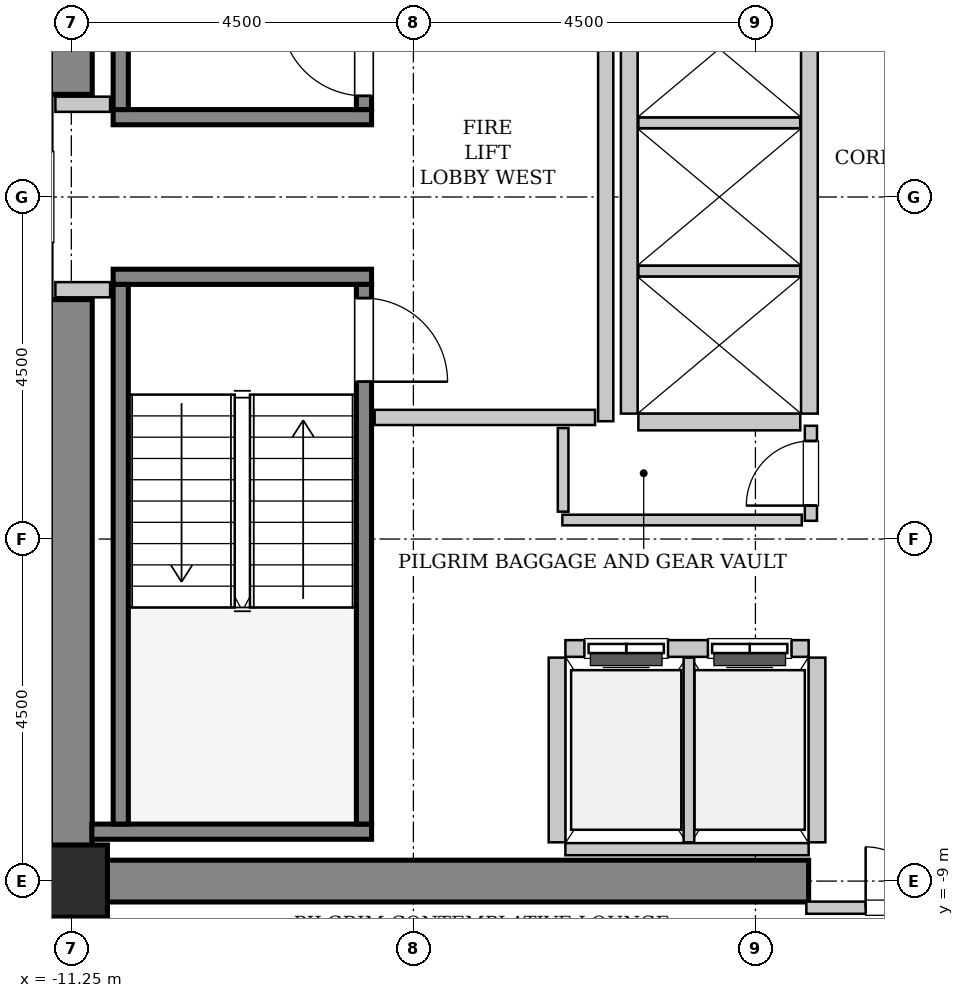
"""IFC4 building model, lengths in metres.
Left out: names, types, materials, properties, quantities, classifications, styles, units other than length and angle.
Written with IfcOpenShell. Run it as: python <this file> out.ifc"""

import sys

from ifc_helpers import new_model, si_unit, direction, frame, frame_2d, origin, origin_2d, place, context, subcontext, project, spatial, rectangle, hollow_rectangle, extrude, source, transform, mapped, element, fill, save


model = new_model("IFC4")
c1 = context("Model", 3, precision=1e-05, world=origin(), true_north=direction((0.0, 1.0)))
c2 = subcontext(c1, "Body", "Model", "MODEL_VIEW")
j1 = project(units=[si_unit("LENGTHUNIT", "METRE"), si_unit("PLANEANGLEUNIT", "RADIAN")], contexts=[c1])
p1 = place(None, origin())
s1 = spatial("IfcSite", under=j1, at=p1, CompositionType="ELEMENT")
p2 = place(p1, origin())
s2 = spatial("IfcBuilding", under=s1, at=p2, CompositionType="ELEMENT")
p3 = place(p2, frame((0.0, 0.0, 179.2)))
s3 = spatial("IfcBuildingStorey", under=s2, at=p3, CompositionType="ELEMENT", Elevation=179.2)
m1 = source(origin(), c2, "Body", "SweptSolid", [
    extrude(rectangle(XDim=9.975, YDim=0.55, at=frame_2d((4.987, 0.0))), origin(), (0.0, 0.0, 1.0), 3.8),
])
p4 = place(p3, frame((-11.525, -9.0, 0.0), z_axis=(0.0, 0.0, 1.0), x_axis=(1.0, 0.0, 0.0)))
e1 = element("IfcWall", 1, at=p4, inside=s3, PredefinedType="SHEAR", context=c2, shape_type="MappedRepresentation", body=[
    mapped(m1, transform((0.0, 0.0, 0.0), x_axis=(1.0, 0.0, 0.0), y_axis=(0.0, 1.0, 0.0), z_axis=(0.0, 0.0, 1.0), scale=1.0)),
])
m2 = source(origin(), c2, "Body", "SweptSolid", [
    extrude(rectangle(XDim=7.375, YDim=0.55, at=frame_2d((3.688, 0.0))), origin(), (0.0, 0.0, 1.0), 3.8),
])
for number, where, z_axis, x_axis in (
    (2, (-11.25, -8.725, 0.0), (0.0, 0.0, 1.0), (0.0, 1.0, 0.0)),
    (3, (-11.25, 1.35, 0.0), (0.0, 0.0, 1.0), (0.0, 1.0, 0.0)),
):
    element("IfcWall", number, at=place(p3, frame(where, z_axis=z_axis, x_axis=x_axis)), inside=s3, PredefinedType="SHEAR", context=c2, shape_type="MappedRepresentation", body=[
        mapped(m2, transform((0.0, 0.0, 0.0), x_axis=(1.0, 0.0, 0.0), y_axis=(0.0, 1.0, 0.0), z_axis=(0.0, 0.0, 1.0), scale=1.0)),
    ])
m3 = source(origin(), c2, "Body", "SweptSolid", [
    extrude(hollow_rectangle(XDim=0.95, YDim=0.95, WallThickness=0.045, InnerFilletRadius=0.045, OuterFilletRadius=0.09, at=origin_2d()), origin(), (0.0, 0.0, 1.0), 3.8),
])
p5 = place(p3, frame((-11.25, -9.0, 0.0), z_axis=(0.0, 0.0, 1.0), x_axis=(1.0, 0.0, 0.0)))
e4 = element("IfcColumn", 4, at=p5, inside=s3, PredefinedType="COLUMN", context=c2, shape_type="MappedRepresentation", body=[
    mapped(m3, transform((0.0, 0.0, 0.0), x_axis=(1.0, 0.0, 0.0), y_axis=(0.0, 1.0, 0.0), z_axis=(0.0, 0.0, 1.0), scale=1.0)),
])
m4 = source(origin(), c2, "Body", "SweptSolid", [
    extrude(rectangle(XDim=3.4, YDim=0.2, at=frame_2d((1.7, 0.0))), origin(), (0.0, 0.0, 1.0), 3.8),
])
p6 = place(p3, frame((-7.3, 1.05, 0.0), z_axis=(0.0, 0.0, 1.0), x_axis=(-1.0, 0.0, 0.0)))
e5 = element("IfcWall", 5, at=p6, inside=s3, PredefinedType="SOLIDWALL", context=c2, shape_type="MappedRepresentation", body=[
    mapped(m4, transform((0.0, 0.0, 0.0), x_axis=(1.0, 0.0, 0.0), y_axis=(0.0, 1.0, 0.0), z_axis=(0.0, 0.0, 1.0), scale=1.0)),
])
m5 = source(origin(), c2, "Body", "SweptSolid", [
    extrude(rectangle(XDim=7.1, YDim=0.2, at=frame_2d((3.55, 0.0))), origin(), (0.0, 0.0, 1.0), 3.8),
])
p7 = place(p3, frame((-7.4, 1.15, 0.0), z_axis=(0.0, 0.0, 1.0), x_axis=(0.0, 1.0, 0.0)))
e6 = element("IfcWall", 6, at=p7, inside=s3, PredefinedType="SOLIDWALL", context=c2, shape_type="MappedRepresentation", body=[
    mapped(m5, transform((0.0, 0.0, 0.0), x_axis=(1.0, 0.0, 0.0), y_axis=(0.0, 1.0, 0.0), z_axis=(0.0, 0.0, 1.0), scale=1.0)),
])
p8 = place(p7, frame((0.18, 0.0, 0.0)))
e7 = element("IfcOpeningElement", 7, at=p8, cuts=e6, PredefinedType="OPENING", context=c2, shape_type="SweptSolid", body=[
    extrude(rectangle(XDim=1.1, YDim=2.15, at=frame_2d((0.55, 1.075))), frame((0.0, 0.11, 0.0), z_axis=(0.0, -1.0, 0.0), x_axis=(1.0, 0.0, 0.0)), (0.0, 0.0, 1.0), 0.22),
])
p9 = place(p3, frame((-10.6, 1.15, 0.0), z_axis=(0.0, 0.0, 1.0), x_axis=(0.0, 1.0, 0.0)))
e8 = element("IfcWall", 8, at=p9, inside=s3, PredefinedType="SOLIDWALL", context=c2, shape_type="MappedRepresentation", body=[
    mapped(m5, transform((0.0, 0.0, 0.0), x_axis=(1.0, 0.0, 0.0), y_axis=(0.0, 1.0, 0.0), z_axis=(0.0, 0.0, 1.0), scale=1.0)),
])
p10 = place(p3, frame((-10.7, -1.05, 0.0), z_axis=(0.0, 0.0, 1.0), x_axis=(1.0, 0.0, 0.0)))
e9 = element("IfcWall", 9, at=p10, inside=s3, PredefinedType="SOLIDWALL", context=c2, shape_type="MappedRepresentation", body=[
    mapped(m4, transform((0.0, 0.0, 0.0), x_axis=(1.0, 0.0, 0.0), y_axis=(0.0, 1.0, 0.0), z_axis=(0.0, 0.0, 1.0), scale=1.0)),
])
m6 = source(origin(), c2, "Body", "SweptSolid", [
    extrude(rectangle(XDim=3.68, YDim=0.2, at=frame_2d((1.84, 0.0))), origin(), (0.0, 0.0, 1.0), 3.8),
])
p11 = place(p3, frame((-10.98, -8.35, 0.0), z_axis=(0.0, 0.0, 1.0), x_axis=(1.0, 0.0, 0.0)))
e10 = element("IfcWall", 10, at=p11, inside=s3, PredefinedType="SOLIDWALL", context=c2, shape_type="MappedRepresentation", body=[
    mapped(m6, transform((0.0, 0.0, 0.0), x_axis=(1.0, 0.0, 0.0), y_axis=(0.0, 1.0, 0.0), z_axis=(0.0, 0.0, 1.0), scale=1.0)),
])
p12 = place(p3, frame((-10.6, -1.15, 0.0), z_axis=(0.0, 0.0, 1.0), x_axis=(0.0, -1.0, 0.0)))
e11 = element("IfcWall", 11, at=p12, inside=s3, PredefinedType="SOLIDWALL", context=c2, shape_type="MappedRepresentation", body=[
    mapped(m5, transform((0.0, 0.0, 0.0), x_axis=(1.0, 0.0, 0.0), y_axis=(0.0, 1.0, 0.0), z_axis=(0.0, 0.0, 1.0), scale=1.0)),
])
p13 = place(p3, frame((-7.4, -1.15, 0.0), z_axis=(0.0, 0.0, 1.0), x_axis=(0.0, -1.0, 0.0)))
e12 = element("IfcWall", 12, at=p13, inside=s3, PredefinedType="SOLIDWALL", context=c2, shape_type="MappedRepresentation", body=[
    mapped(m5, transform((0.0, 0.0, 0.0), x_axis=(1.0, 0.0, 0.0), y_axis=(0.0, 1.0, 0.0), z_axis=(0.0, 0.0, 1.0), scale=1.0)),
])
p14 = place(p13, frame((0.18, 0.0, 0.0)))
e13 = element("IfcOpeningElement", 13, at=p14, cuts=e12, PredefinedType="OPENING", context=c2, shape_type="SweptSolid", body=[
    extrude(rectangle(XDim=1.1, YDim=2.15, at=frame_2d((0.55, 1.075))), frame((0.0, 0.11, 0.0), z_axis=(0.0, -1.0, 0.0), x_axis=(1.0, 0.0, 0.0)), (0.0, 0.0, 1.0), 0.22),
])
m7 = source(origin(), c2, "Body", "SweptSolid", [
    extrude(rectangle(XDim=3.2, YDim=0.22, at=frame_2d((1.6, 0.0))), origin(), (0.0, 0.0, 1.0), 3.535),
])
p15 = place(p3, frame((-1.55, -5.94, 0.0), z_axis=(0.0, 0.0, 1.0), x_axis=(-1.0, 0.0, 0.0)))
e14 = element("IfcWall", 14, at=p15, inside=s3, PredefinedType="SOLIDWALL", context=c2, shape_type="MappedRepresentation", body=[
    mapped(m7, transform((0.0, 0.0, 0.0), x_axis=(1.0, 0.0, 0.0), y_axis=(0.0, 1.0, 0.0), z_axis=(0.0, 0.0, 1.0), scale=1.0)),
])
p16 = place(p15, frame((1.85, 0.0, 0.0)))
e15 = element("IfcOpeningElement", 15, at=p16, cuts=e14, PredefinedType="OPENING", context=c2, shape_type="SweptSolid", body=[
    extrude(rectangle(XDim=1.1, YDim=2.2, at=frame_2d((0.55, 1.1))), frame((0.0, 0.12, 0.0), z_axis=(0.0, -1.0, 0.0), x_axis=(1.0, 0.0, 0.0)), (0.0, 0.0, 1.0), 0.24),
])
p17 = place(p15, frame((0.225, 0.0, 0.0)))
e16 = element("IfcOpeningElement", 16, at=p17, cuts=e14, PredefinedType="OPENING", context=c2, shape_type="SweptSolid", body=[
    extrude(rectangle(XDim=1.1, YDim=2.2, at=frame_2d((0.55, 1.1))), frame((0.0, 0.12, 0.0), z_axis=(0.0, -1.0, 0.0), x_axis=(1.0, 0.0, 0.0)), (0.0, 0.0, 1.0), 0.24),
])
m8 = source(origin(), c2, "Body", "SweptSolid", [
    extrude(rectangle(XDim=3.2, YDim=0.16, at=frame_2d((1.6, 0.0))), origin(), (0.0, 0.0, 1.0), 2.425),
])
p18 = place(p3, frame((-4.75, -8.58, 0.0), z_axis=(0.0, 0.0, 1.0), x_axis=(1.0, 0.0, 0.0)))
e17 = element("IfcWall", 17, at=p18, inside=s3, PredefinedType="PARTITIONING", context=c2, shape_type="MappedRepresentation", body=[
    mapped(m8, transform((0.0, 0.0, 0.0), x_axis=(1.0, 0.0, 0.0), y_axis=(0.0, 1.0, 0.0), z_axis=(0.0, 0.0, 1.0), scale=1.0)),
])
m9 = source(origin(), c2, "Body", "SweptSolid", [
    extrude(rectangle(XDim=2.43, YDim=0.22, at=frame_2d((1.215, 0.0))), origin(), (0.0, 0.0, 1.0), 3.535),
])
p19 = place(p3, frame((-4.86, -6.06, 0.0), z_axis=(0.0, 0.0, 1.0), x_axis=(0.0, -1.0, 0.0)))
e18 = element("IfcWall", 18, at=p19, inside=s3, PredefinedType="SOLIDWALL", context=c2, shape_type="MappedRepresentation", body=[
    mapped(m9, transform((0.0, 0.0, 0.0), x_axis=(1.0, 0.0, 0.0), y_axis=(0.0, 1.0, 0.0), z_axis=(0.0, 0.0, 1.0), scale=1.0)),
])
m10 = source(origin(), c2, "Body", "SweptSolid", [
    extrude(rectangle(XDim=2.43, YDim=0.14, at=frame_2d((1.215, 0.0))), origin(), (0.0, 0.0, 1.0), 3.535),
])
p20 = place(p3, frame((-3.125, -8.49, 0.0), z_axis=(0.0, 0.0, 1.0), x_axis=(0.0, 1.0, 0.0)))
e19 = element("IfcWall", 19, at=p20, inside=s3, PredefinedType="PARTITIONING", context=c2, shape_type="MappedRepresentation", body=[
    mapped(m10, transform((0.0, 0.0, 0.0), x_axis=(1.0, 0.0, 0.0), y_axis=(0.0, 1.0, 0.0), z_axis=(0.0, 0.0, 1.0), scale=1.0)),
])
p21 = place(p3, frame((-1.44, -8.49, 0.0), z_axis=(0.0, 0.0, 1.0), x_axis=(0.0, 1.0, 0.0)))
e20 = element("IfcWall", 20, at=p21, inside=s3, PredefinedType="SOLIDWALL", context=c2, shape_type="MappedRepresentation", body=[
    mapped(m9, transform((0.0, 0.0, 0.0), x_axis=(1.0, 0.0, 0.0), y_axis=(0.0, 1.0, 0.0), z_axis=(0.0, 0.0, 1.0), scale=1.0)),
])
m11 = source(origin(), c2, "Body", "SweptSolid", [
    extrude(rectangle(XDim=5.7, YDim=0.22, at=frame_2d((2.85, 0.0))), origin(), (0.0, 0.0, 1.0), 3.535),
])
for number, where, z_axis, x_axis in (
    (21, (-1.54, -2.85, 0.0), (0.0, 0.0, 1.0), (0.0, 1.0, 0.0)),
    (22, (-3.91, 2.85, 0.0), (0.0, 0.0, 1.0), (0.0, -1.0, 0.0)),
):
    element("IfcWall", number, at=place(p3, frame(where, z_axis=z_axis, x_axis=x_axis)), inside=s3, PredefinedType="SOLIDWALL", context=c2, shape_type="MappedRepresentation", body=[
        mapped(m11, transform((0.0, 0.0, 0.0), x_axis=(1.0, 0.0, 0.0), y_axis=(0.0, 1.0, 0.0), z_axis=(0.0, 0.0, 1.0), scale=1.0)),
    ])
m12 = source(origin(), c2, "Body", "SweptSolid", [
    extrude(rectangle(XDim=2.13, YDim=0.22, at=frame_2d((1.065, 0.0))), origin(), (0.0, 0.0, 1.0), 3.535),
])
p22 = place(p3, frame((-3.79, -2.96, 0.0), z_axis=(0.0, 0.0, 1.0), x_axis=(1.0, 0.0, 0.0)))
e23 = element("IfcWall", 23, at=p22, inside=s3, PredefinedType="SOLIDWALL", context=c2, shape_type="MappedRepresentation", body=[
    mapped(m12, transform((0.0, 0.0, 0.0), x_axis=(1.0, 0.0, 0.0), y_axis=(0.0, 1.0, 0.0), z_axis=(0.0, 0.0, 1.0), scale=1.0)),
])
m13 = source(origin(), c2, "Body", "SweptSolid", [
    extrude(rectangle(XDim=2.13, YDim=0.14, at=frame_2d((1.065, 0.0))), origin(), (0.0, 0.0, 1.0), 3.535),
])
for number, where, z_axis, x_axis in (
    (24, (-3.79, -0.975, 0.0), (0.0, 0.0, 1.0), (1.0, 0.0, 0.0)),
    (25, (-3.79, 0.975, 0.0), (0.0, 0.0, 1.0), (1.0, 0.0, 0.0)),
):
    element("IfcWall", number, at=place(p3, frame(where, z_axis=z_axis, x_axis=x_axis)), inside=s3, PredefinedType="PARTITIONING", context=c2, shape_type="MappedRepresentation", body=[
        mapped(m13, transform((0.0, 0.0, 0.0), x_axis=(1.0, 0.0, 0.0), y_axis=(0.0, 1.0, 0.0), z_axis=(0.0, 0.0, 1.0), scale=1.0)),
    ])
m14 = source(origin(), c2, "Body", "SweptSolid", [
    extrude(rectangle(XDim=5.9, YDim=0.2, at=frame_2d((2.95, 0.0))), origin(), (0.0, 0.0, 1.0), 3.535),
])
p23 = place(p3, frame((-4.22, -2.95, 0.0), z_axis=(0.0, 0.0, 1.0), x_axis=(0.0, 1.0, 0.0)))
e26 = element("IfcWall", 26, at=p23, inside=s3, PredefinedType="PARTITIONING", context=c2, shape_type="MappedRepresentation", body=[
    mapped(m14, transform((0.0, 0.0, 0.0), x_axis=(1.0, 0.0, 0.0), y_axis=(0.0, 1.0, 0.0), z_axis=(0.0, 0.0, 1.0), scale=1.0)),
])
m15 = source(origin(), c2, "Body", "SweptSolid", [
    extrude(rectangle(XDim=2.9, YDim=0.2, at=frame_2d((1.45, 0.0))), origin(), (0.0, 0.0, 1.0), 3.535),
])
p24 = place(p3, frame((-7.26, -2.9, 0.0), z_axis=(0.0, 0.0, 1.0), x_axis=(1.0, 0.0, 0.0)))
e27 = element("IfcWall", 27, at=p24, inside=s3, PredefinedType="PARTITIONING", context=c2, shape_type="MappedRepresentation", body=[
    mapped(m15, transform((0.0, 0.0, 0.0), x_axis=(1.0, 0.0, 0.0), y_axis=(0.0, 1.0, 0.0), z_axis=(0.0, 0.0, 1.0), scale=1.0)),
])
m16 = source(origin(), c2, "Body", "SweptSolid", [
    extrude(rectangle(XDim=0.72, YDim=0.2, at=frame_2d((0.36, 0.0))), origin(), (0.0, 0.0, 1.0), 3.535),
])
for number, where, z_axis, x_axis in (
    (28, (-11.46, 1.22, 0.0), (0.0, 0.0, 1.0), (1.0, 0.0, 0.0)),
    (29, (-11.46, -1.22, 0.0), (0.0, 0.0, 1.0), (1.0, 0.0, 0.0)),
):
    element("IfcWall", number, at=place(p3, frame(where, z_axis=z_axis, x_axis=x_axis)), inside=s3, PredefinedType="PARTITIONING", context=c2, shape_type="MappedRepresentation", body=[
        mapped(m16, transform((0.0, 0.0, 0.0), x_axis=(1.0, 0.0, 0.0), y_axis=(0.0, 1.0, 0.0), z_axis=(0.0, 0.0, 1.0), scale=1.0)),
    ])
m17 = source(origin(), c2, "Body", "SweptSolid", [
    extrude(rectangle(XDim=3.16, YDim=0.16, at=frame_2d((1.58, 0.0))), origin(), (0.0, 0.0, 1.0), 2.425),
])
p25 = place(p3, frame((-1.58, -9.35, 0.0), z_axis=(0.0, 0.0, 1.0), x_axis=(1.0, 0.0, 0.0)))
e30 = element("IfcWall", 30, at=p25, inside=s3, PredefinedType="PARTITIONING", context=c2, shape_type="MappedRepresentation", body=[
    mapped(m17, transform((0.0, 0.0, 0.0), x_axis=(1.0, 0.0, 0.0), y_axis=(0.0, 1.0, 0.0), z_axis=(0.0, 0.0, 1.0), scale=1.0)),
])
p26 = place(p25, frame((0.78, 0.0, 0.0)))
e31 = element("IfcOpeningElement", 31, at=p26, cuts=e30, PredefinedType="OPENING", context=c2, shape_type="SweptSolid", body=[
    extrude(rectangle(XDim=1.6, YDim=2.3, at=frame_2d((0.8, 1.15))), frame((0.0, 0.09, 0.0), z_axis=(0.0, -1.0, 0.0), x_axis=(1.0, 0.0, 0.0)), (0.0, 0.0, 1.0), 0.18),
])
m18 = source(origin(), c2, "Body", "SweptSolid", [
    extrude(rectangle(XDim=1.25, YDim=0.16, at=frame_2d((0.625, 0.0))), origin(), (0.0, 0.0, 1.0), 3.535),
])
p27 = place(p3, frame((-1.52, -4.26, 0.0), z_axis=(0.0, 0.0, 1.0), x_axis=(0.0, 1.0, 0.0)))
e32 = element("IfcWall", 32, at=p27, inside=s3, PredefinedType="PARTITIONING", context=c2, shape_type="MappedRepresentation", body=[
    mapped(m18, transform((0.0, 0.0, 0.0), x_axis=(1.0, 0.0, 0.0), y_axis=(0.0, 1.0, 0.0), z_axis=(0.0, 0.0, 1.0), scale=1.0)),
])
p28 = place(p27, frame((0.2, 0.0, 0.0)))
e33 = element("IfcOpeningElement", 33, at=p28, cuts=e32, PredefinedType="OPENING", context=c2, shape_type="SweptSolid", body=[
    extrude(rectangle(XDim=0.85, YDim=2.1, at=frame_2d((0.425, 1.05))), frame((0.0, 0.09, 0.0), z_axis=(0.0, -1.0, 0.0), x_axis=(1.0, 0.0, 0.0)), (0.0, 0.0, 1.0), 0.18),
])
m19 = source(origin(), c2, "Body", "SweptSolid", [
    extrude(rectangle(XDim=3.15, YDim=0.14, at=frame_2d((1.575, 0.0))), origin(), (0.0, 0.0, 1.0), 3.535),
])
p29 = place(p3, frame((-4.79, -4.25, 0.0), z_axis=(0.0, 0.0, 1.0), x_axis=(1.0, 0.0, 0.0)))
e34 = element("IfcWall", 34, at=p29, inside=s3, PredefinedType="PARTITIONING", context=c2, shape_type="MappedRepresentation", body=[
    mapped(m19, transform((0.0, 0.0, 0.0), x_axis=(1.0, 0.0, 0.0), y_axis=(0.0, 1.0, 0.0), z_axis=(0.0, 0.0, 1.0), scale=1.0)),
])
m20 = source(origin(), c2, "Body", "SweptSolid", [
    extrude(rectangle(XDim=1.1, YDim=0.14, at=frame_2d((0.55, 0.0))), origin(), (0.0, 0.0, 1.0), 3.535),
])
p30 = place(p3, frame((-4.78, -4.14, 0.0), z_axis=(0.0, 0.0, 1.0), x_axis=(0.0, 1.0, 0.0)))
e35 = element("IfcWall", 35, at=p30, inside=s3, PredefinedType="PARTITIONING", context=c2, shape_type="MappedRepresentation", body=[
    mapped(m20, transform((0.0, 0.0, 0.0), x_axis=(1.0, 0.0, 0.0), y_axis=(0.0, 1.0, 0.0), z_axis=(0.0, 0.0, 1.0), scale=1.0)),
])
m21 = source(origin(), c2, "Body", "SweptSolid", [
    extrude(rectangle(XDim=1.1, YDim=2.15, at=frame_2d((0.55, 1.075))), frame((0.0, 0.025, 0.0), z_axis=(0.0, -1.0, 0.0), x_axis=(1.0, 0.0, 0.0)), (0.0, 0.0, 1.0), 0.05),
])
p31 = place(p8, origin())
e36 = element("IfcDoor", 36, at=p31, inside=s3, OperationType="SINGLE_SWING_RIGHT", PredefinedType="DOOR", context=c2, shape_type="MappedRepresentation", body=[
    mapped(m21, transform((0.0, 0.0, 0.0), x_axis=(1.0, 0.0, 0.0), y_axis=(0.0, 1.0, 0.0), z_axis=(0.0, 0.0, 1.0), scale=1.0)),
])
fill(e7, e36)
p32 = place(p14, origin())
e37 = element("IfcDoor", 37, at=p32, inside=s3, OperationType="SINGLE_SWING_RIGHT", PredefinedType="DOOR", context=c2, shape_type="MappedRepresentation", body=[
    mapped(m21, transform((0.0, 0.0, 0.0), x_axis=(1.0, 0.0, 0.0), y_axis=(0.0, 1.0, 0.0), z_axis=(0.0, 0.0, 1.0), scale=1.0)),
])
fill(e13, e37)
m22 = source(origin(), c2, "Body", "SweptSolid", [
    extrude(rectangle(XDim=1.1, YDim=2.2, at=frame_2d((0.55, 1.1))), frame((0.0, 0.025, 0.0), z_axis=(0.0, -1.0, 0.0), x_axis=(1.0, 0.0, 0.0)), (0.0, 0.0, 1.0), 0.05),
])
p33 = place(p16, origin())
e38 = element("IfcDoor", 38, at=p33, inside=s3, OperationType="DOUBLE_DOOR_SLIDING", PredefinedType="DOOR", context=c2, shape_type="MappedRepresentation", body=[
    mapped(m22, transform((0.0, 0.0, 0.0), x_axis=(1.0, 0.0, 0.0), y_axis=(0.0, 1.0, 0.0), z_axis=(0.0, 0.0, 1.0), scale=1.0)),
])
fill(e15, e38)
p34 = place(p17, origin())
e39 = element("IfcDoor", 39, at=p34, inside=s3, OperationType="DOUBLE_DOOR_SLIDING", PredefinedType="DOOR", context=c2, shape_type="MappedRepresentation", body=[
    mapped(m22, transform((0.0, 0.0, 0.0), x_axis=(1.0, 0.0, 0.0), y_axis=(0.0, 1.0, 0.0), z_axis=(0.0, 0.0, 1.0), scale=1.0)),
])
fill(e16, e39)
m23 = source(origin(), c2, "Body", "SweptSolid", [
    extrude(rectangle(XDim=1.6, YDim=2.3, at=frame_2d((0.8, 1.15))), frame((0.0, 0.025, 0.0), z_axis=(0.0, -1.0, 0.0), x_axis=(1.0, 0.0, 0.0)), (0.0, 0.0, 1.0), 0.05),
])
p35 = place(p26, origin())
e40 = element("IfcDoor", 40, at=p35, inside=s3, OperationType="DOUBLE_DOOR_SINGLE_SWING", PredefinedType="DOOR", context=c2, shape_type="MappedRepresentation", body=[
    mapped(m23, transform((0.0, 0.0, 0.0), x_axis=(1.0, 0.0, 0.0), y_axis=(0.0, 1.0, 0.0), z_axis=(0.0, 0.0, 1.0), scale=1.0)),
])
fill(e31, e40)
m24 = source(origin(), c2, "Body", "SweptSolid", [
    extrude(rectangle(XDim=0.85, YDim=2.1, at=frame_2d((0.425, 1.05))), frame((0.0, 0.025, 0.0), z_axis=(0.0, -1.0, 0.0), x_axis=(1.0, 0.0, 0.0)), (0.0, 0.0, 1.0), 0.05),
])
p36 = place(p28, origin())
e41 = element("IfcDoor", 41, at=p36, inside=s3, OperationType="SINGLE_SWING_LEFT", PredefinedType="DOOR", context=c2, shape_type="MappedRepresentation", body=[
    mapped(m24, transform((0.0, 0.0, 0.0), x_axis=(1.0, 0.0, 0.0), y_axis=(0.0, 1.0, 0.0), z_axis=(0.0, 0.0, 1.0), scale=1.0)),
])
fill(e33, e41)
save(model, sys.argv[1])
